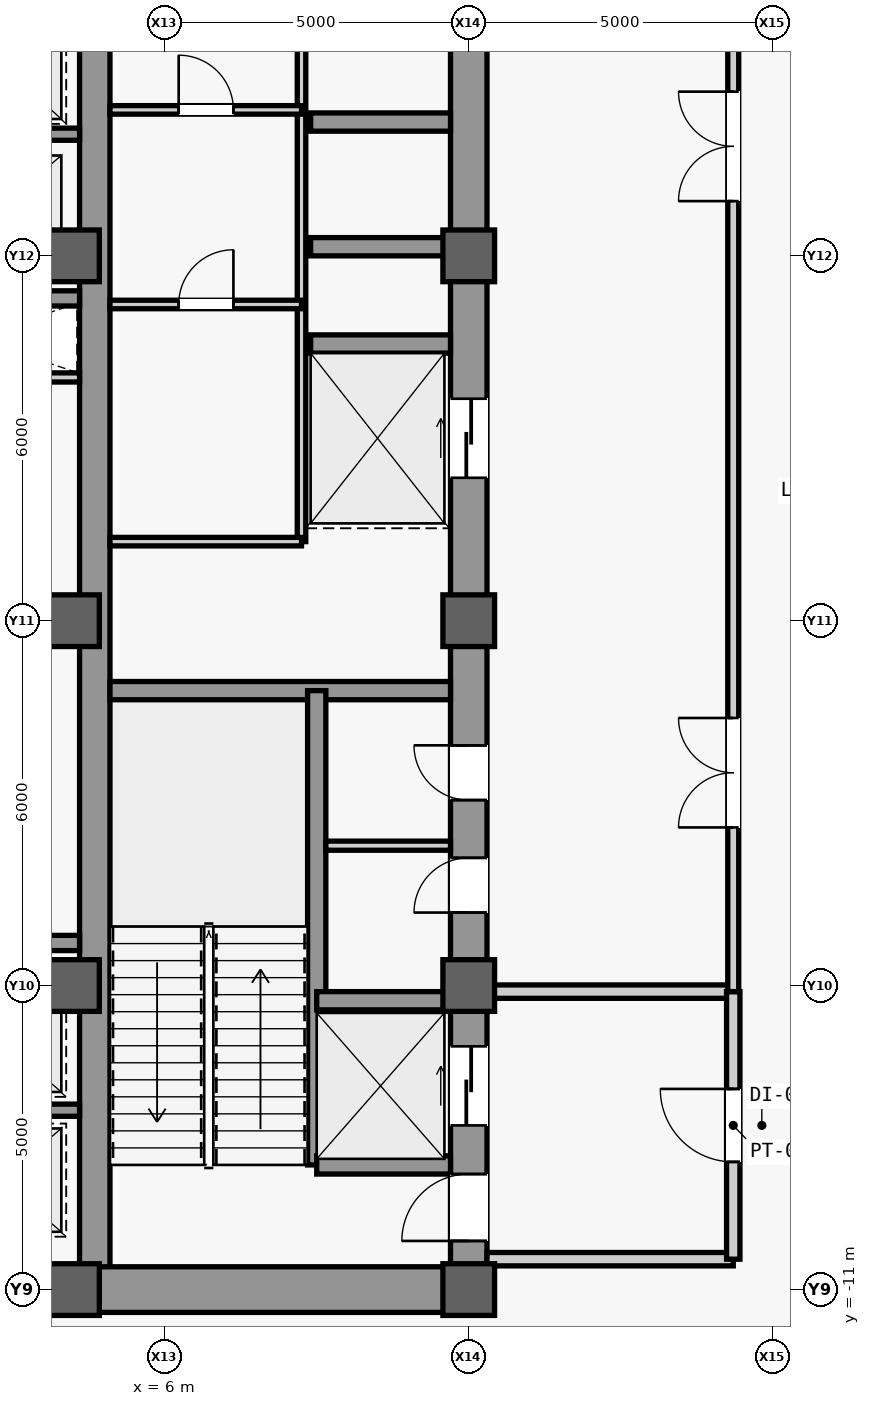
"""IFC4 building model, lengths in metres.
Left out: names, types, materials, properties, quantities, classifications, styles, units other than length and angle.
Written with IfcOpenShell. Run it as: python <this file> out.ifc"""

import sys

from ifc_helpers import new_model, si_unit, direction, frame, frame_2d, origin, origin_2d, place, context, subcontext, project, spatial, rectangle, extrude, source, transform, mapped, element, fill, save


model = new_model("IFC4")
c1 = context("Model", 3, precision=1e-05, world=origin(), true_north=direction((0.0, 1.0)))
c2 = subcontext(c1, "Body", "Model", "MODEL_VIEW")
j1 = project(units=[si_unit("LENGTHUNIT", "METRE"), si_unit("PLANEANGLEUNIT", "RADIAN")], contexts=[c1])
p1 = place(None, origin())
s1 = spatial("IfcSite", under=j1, at=p1, CompositionType="ELEMENT")
p2 = place(p1, origin())
s2 = spatial("IfcBuilding", under=s1, at=p2, CompositionType="ELEMENT")
p3 = place(p2, frame((0.0, 0.0, 144.7)))
s3 = spatial("IfcBuildingStorey", under=s2, at=p3, CompositionType="ELEMENT", Elevation=144.7)
m1 = source(origin(), c2, "Body", "SweptSolid", [
    extrude(rectangle(XDim=22.0, YDim=0.6, at=frame_2d((11.0, 0.0))), origin(), (0.0, 0.0, 1.0), 4.6),
])
p4 = place(p3, frame((11.0, -11.0, 0.0), z_axis=(0.0, 0.0, 1.0), x_axis=(0.0, 1.0, 0.0)))
e1 = element("IfcWall", 1, at=p4, inside=s3, PredefinedType="SHEAR", context=c2, shape_type="MappedRepresentation", body=[
    mapped(m1, transform((0.0, 0.0, 0.0), scale=1.0)),
])
m2 = source(origin(), c2, "Body", "SweptSolid", [
    extrude(rectangle(XDim=1.1, YDim=2.2, at=frame_2d((0.55, 1.1))), frame((0.0, 0.31, 0.0), z_axis=(0.0, -1.0, 0.0), x_axis=(1.0, 0.0, 0.0)), (0.0, 0.0, 1.0), 0.62),
])
p5 = place(p4, frame((0.8, 0.0, 0.0)))
e2 = element("IfcOpeningElement", 2, at=p5, cuts=e1, PredefinedType="OPENING", context=c2, shape_type="MappedRepresentation", body=[
    mapped(m2, transform((0.0, 0.0, 0.0), scale=1.0)),
])
m3 = source(origin(), c2, "Body", "SweptSolid", [
    extrude(rectangle(XDim=0.9, YDim=2.15, at=frame_2d((0.45, 1.075))), frame((0.0, 0.31, 0.0), z_axis=(0.0, -1.0, 0.0), x_axis=(1.0, 0.0, 0.0)), (0.0, 0.0, 1.0), 0.62),
])
p6 = place(p4, frame((6.2, 0.0, 0.0)))
e3 = element("IfcOpeningElement", 3, at=p6, cuts=e1, PredefinedType="OPENING", context=c2, shape_type="MappedRepresentation", body=[
    mapped(m3, transform((0.0, 0.0, 0.0), scale=1.0)),
])
p7 = place(p4, frame((8.05, 0.0, 0.0)))
e4 = element("IfcOpeningElement", 4, at=p7, cuts=e1, PredefinedType="OPENING", context=c2, shape_type="MappedRepresentation", body=[
    mapped(m3, transform((0.0, 0.0, 0.0), scale=1.0)),
])
m4 = source(origin(), c2, "Body", "SweptSolid", [
    extrude(rectangle(XDim=1.3, YDim=2.3, at=frame_2d((0.65, 1.15))), frame((0.0, 0.31, 0.0), z_axis=(0.0, -1.0, 0.0), x_axis=(1.0, 0.0, 0.0)), (0.0, 0.0, 1.0), 0.62),
])
p8 = place(p4, frame((2.7, 0.0, 0.0)))
e5 = element("IfcOpeningElement", 5, at=p8, cuts=e1, PredefinedType="OPENING", context=c2, shape_type="MappedRepresentation", body=[
    mapped(m4, transform((0.0, 0.0, 0.0), scale=1.0)),
])
p9 = place(p4, frame((13.35, 0.0, 0.0)))
e6 = element("IfcOpeningElement", 6, at=p9, cuts=e1, PredefinedType="OPENING", context=c2, shape_type="MappedRepresentation", body=[
    mapped(m4, transform((0.0, 0.0, 0.0), scale=1.0)),
])
m5 = source(origin(), c2, "Body", "SweptSolid", [
    extrude(rectangle(XDim=21.4, YDim=0.5, at=frame_2d((10.7, 0.0))), origin(), (0.0, 0.0, 1.0), 4.6),
])
p10 = place(p3, frame((4.85, -10.7, 0.0), z_axis=(0.0, 0.0, 1.0), x_axis=(0.0, 1.0, 0.0)))
e7 = element("IfcWall", 7, at=p10, inside=s3, PredefinedType="SHEAR", context=c2, shape_type="MappedRepresentation", body=[
    mapped(m5, transform((0.0, 0.0, 0.0), scale=1.0)),
])
m6 = source(origin(), c2, "Body", "SweptSolid", [
    extrude(rectangle(XDim=5.85, YDim=0.75, at=frame_2d((2.925, 0.0))), origin(), (0.0, 0.0, 1.0), 4.6),
])
p11 = place(p3, frame((4.85, -11.0, 0.0), z_axis=(0.0, 0.0, 1.0), x_axis=(1.0, 0.0, 0.0)))
e8 = element("IfcWall", 8, at=p11, inside=s3, PredefinedType="SHEAR", context=c2, shape_type="MappedRepresentation", body=[
    mapped(m6, transform((0.0, 0.0, 0.0), scale=1.0)),
])
m7 = source(origin(), c2, "Body", "SweptSolid", [
    extrude(rectangle(XDim=5.6, YDim=0.3, at=frame_2d((2.8, 0.0))), origin(), (0.0, 0.0, 1.0), 4.6),
])
p12 = place(p3, frame((5.1, -1.15, 0.0), z_axis=(0.0, 0.0, 1.0), x_axis=(1.0, 0.0, 0.0)))
e9 = element("IfcWall", 9, at=p12, inside=s3, PredefinedType="SHEAR", context=c2, shape_type="MappedRepresentation", body=[
    mapped(m7, transform((0.0, 0.0, 0.0), scale=1.0)),
])
m8 = source(origin(), c2, "Body", "SweptSolid", [
    extrude(rectangle(XDim=9.2, YDim=0.5, at=frame_2d((4.6, 0.0))), origin(), (0.0, 0.0, 1.0), 4.6),
])
p13 = place(p3, frame((-4.6, -11.0, 0.0), z_axis=(0.0, 0.0, 1.0), x_axis=(1.0, 0.0, 0.0)))
e10 = element("IfcWall", 10, at=p13, inside=s3, PredefinedType="SHEAR", context=c2, shape_type="MappedRepresentation", body=[
    mapped(m8, transform((0.0, 0.0, 0.0), scale=1.0)),
])
m9 = source(origin(), c2, "Body", "SweptSolid", [
    extrude(rectangle(XDim=1.8, YDim=2.25, at=frame_2d((0.9, 1.125))), frame((0.0, 0.26, 0.0), z_axis=(0.0, -1.0, 0.0), x_axis=(1.0, 0.0, 0.0)), (0.0, 0.0, 1.0), 0.52),
])
p14 = place(p13, frame((3.7, 0.0, 0.0)))
e11 = element("IfcOpeningElement", 11, at=p14, cuts=e10, PredefinedType="OPENING", context=c2, shape_type="MappedRepresentation", body=[
    mapped(m9, transform((0.0, 0.0, 0.0), scale=1.0)),
])
m10 = source(origin(), c2, "Body", "SweptSolid", [
    extrude(rectangle(XDim=0.85, YDim=0.85, at=origin_2d()), origin(), (0.0, 0.0, 1.0), 5.2),
])
for number, where, z_axis, x_axis in (
    (12, (4.5, -11.0, 0.0), (0.0, 0.0, 1.0), (1.0, 0.0, 0.0)),
    (13, (4.5, -6.0, 0.0), (0.0, 0.0, 1.0), (1.0, 0.0, 0.0)),
    (14, (4.5, 0.0, 0.0), (0.0, 0.0, 1.0), (1.0, 0.0, 0.0)),
    (15, (4.5, 6.0, 0.0), (0.0, 0.0, 1.0), (1.0, 0.0, 0.0)),
    (16, (11.0, -11.0, 0.0), (0.0, 0.0, 1.0), (1.0, 0.0, 0.0)),
    (17, (11.0, -6.0, 0.0), (0.0, 0.0, 1.0), (1.0, 0.0, 0.0)),
    (18, (11.0, 0.0, 0.0), (0.0, 0.0, 1.0), (1.0, 0.0, 0.0)),
    (19, (11.0, 6.0, 0.0), (0.0, 0.0, 1.0), (1.0, 0.0, 0.0)),
):
    element("IfcColumn", number, at=place(p3, frame(where, z_axis=z_axis, x_axis=x_axis)), inside=s3, PredefinedType="COLUMN", context=c2, shape_type="MappedRepresentation", body=[
        mapped(m10, transform((0.0, 0.0, 0.0), scale=1.0)),
    ])
m11 = source(origin(), c2, "Body", "SweptSolid", [
    extrude(rectangle(XDim=7.8, YDim=0.3, at=frame_2d((3.9, 0.0))), origin(), (0.0, 0.0, 1.0), 4.6),
])
p15 = place(p3, frame((8.5, -8.95, 0.0), z_axis=(0.0, 0.0, 1.0), x_axis=(0.0, 1.0, 0.0)))
e20 = element("IfcWall", 20, at=p15, inside=s3, PredefinedType="SHEAR", context=c2, shape_type="MappedRepresentation", body=[
    mapped(m11, transform((0.0, 0.0, 0.0), scale=1.0)),
])
m12 = source(origin(), c2, "Body", "SweptSolid", [
    extrude(rectangle(XDim=2.2, YDim=0.3, at=frame_2d((1.1, 0.0))), origin(), (0.0, 0.0, 1.0), 4.6),
])
for number, where, z_axis, x_axis in (
    (21, (8.5, -8.95, 0.0), (0.0, 0.0, 1.0), (1.0, 0.0, 0.0)),
    (22, (8.5, -6.25, 0.0), (0.0, 0.0, 1.0), (1.0, 0.0, 0.0)),
):
    element("IfcWall", number, at=place(p3, frame(where, z_axis=z_axis, x_axis=x_axis)), inside=s3, PredefinedType="SHEAR", context=c2, shape_type="MappedRepresentation", body=[
        mapped(m12, transform((0.0, 0.0, 0.0), scale=1.0)),
    ])
m13 = source(origin(), c2, "Body", "SweptSolid", [
    extrude(rectangle(XDim=2.3, YDim=0.3, at=frame_2d((1.15, 0.0))), origin(), (0.0, 0.0, 1.0), 4.6),
])
for number, where, z_axis, x_axis in (
    (23, (8.4, 4.55, 0.0), (0.0, 0.0, 1.0), (1.0, 0.0, 0.0)),
    (24, (8.4, 6.15, 0.0), (0.0, 0.0, 1.0), (1.0, 0.0, 0.0)),
    (25, (8.4, 8.2, 0.0), (0.0, 0.0, 1.0), (1.0, 0.0, 0.0)),
):
    element("IfcWall", number, at=place(p3, frame(where, z_axis=z_axis, x_axis=x_axis)), inside=s3, PredefinedType="SHEAR", context=c2, shape_type="MappedRepresentation", body=[
        mapped(m13, transform((0.0, 0.0, 0.0), scale=1.0)),
    ])
m14 = source(origin(), c2, "Body", "SweptSolid", [
    extrude(rectangle(XDim=2.05, YDim=0.15, at=frame_2d((1.025, 0.0))), origin(), (0.0, 0.0, 1.0), 4.6),
])
p16 = place(p3, frame((8.65, -3.7, 0.0), z_axis=(0.0, 0.0, 1.0), x_axis=(1.0, 0.0, 0.0)))
e26 = element("IfcWall", 26, at=p16, inside=s3, PredefinedType="PARTITIONING", context=c2, shape_type="MappedRepresentation", body=[
    mapped(m14, transform((0.0, 0.0, 0.0), scale=1.0)),
])
m15 = source(origin(), c2, "Body", "SweptSolid", [
    extrude(rectangle(XDim=9.4, YDim=0.14, at=frame_2d((4.7, 0.0))), origin(), (0.0, 0.0, 1.0), 4.6),
])
p17 = place(p3, frame((8.25, 1.3, 0.0), z_axis=(0.0, 0.0, 1.0), x_axis=(0.0, 1.0, 0.0)))
e27 = element("IfcWall", 27, at=p17, inside=s3, PredefinedType="PARTITIONING", context=c2, shape_type="MappedRepresentation", body=[
    mapped(m15, transform((0.0, 0.0, 0.0), scale=1.0)),
])
m16 = source(origin(), c2, "Body", "SweptSolid", [
    extrude(rectangle(XDim=3.15, YDim=0.14, at=frame_2d((1.575, 0.0))), origin(), (0.0, 0.0, 1.0), 4.6),
])
p18 = place(p3, frame((5.1, 1.3, 0.0), z_axis=(0.0, 0.0, 1.0), x_axis=(1.0, 0.0, 0.0)))
e28 = element("IfcWall", 28, at=p18, inside=s3, PredefinedType="PARTITIONING", context=c2, shape_type="MappedRepresentation", body=[
    mapped(m16, transform((0.0, 0.0, 0.0), scale=1.0)),
])
p19 = place(p3, frame((5.1, 8.4, 0.0), z_axis=(0.0, 0.0, 1.0), x_axis=(1.0, 0.0, 0.0)))
e29 = element("IfcWall", 29, at=p19, inside=s3, PredefinedType="PARTITIONING", context=c2, shape_type="MappedRepresentation", body=[
    mapped(m16, transform((0.0, 0.0, 0.0), scale=1.0)),
])
m17 = source(origin(), c2, "Body", "SweptSolid", [
    extrude(rectangle(XDim=0.9, YDim=2.15, at=frame_2d((0.45, 1.075))), frame((0.0, 0.08, 0.0), z_axis=(0.0, -1.0, 0.0), x_axis=(1.0, 0.0, 0.0)), (0.0, 0.0, 1.0), 0.16),
])
p20 = place(p19, frame((1.13, 0.0, 0.0)))
e30 = element("IfcOpeningElement", 30, at=p20, cuts=e29, PredefinedType="OPENING", context=c2, shape_type="MappedRepresentation", body=[
    mapped(m17, transform((0.0, 0.0, 0.0), scale=1.0)),
])
p21 = place(p3, frame((5.1, 5.2, 0.0), z_axis=(0.0, 0.0, 1.0), x_axis=(1.0, 0.0, 0.0)))
e31 = element("IfcWall", 31, at=p21, inside=s3, PredefinedType="PARTITIONING", context=c2, shape_type="MappedRepresentation", body=[
    mapped(m16, transform((0.0, 0.0, 0.0), scale=1.0)),
])
p22 = place(p21, frame((1.13, 0.0, 0.0)))
e32 = element("IfcOpeningElement", 32, at=p22, cuts=e31, PredefinedType="OPENING", context=c2, shape_type="MappedRepresentation", body=[
    mapped(m17, transform((0.0, 0.0, 0.0), scale=1.0)),
])
m18 = source(origin(), c2, "Body", "SweptSolid", [
    extrude(rectangle(XDim=4.05, YDim=0.22, at=frame_2d((2.025, 0.0))), origin(), (0.0, 0.0, 1.0), 4.6),
])
p23 = place(p3, frame((11.3, -10.5, 0.0), z_axis=(0.0, 0.0, 1.0), x_axis=(1.0, 0.0, 0.0)))
e33 = element("IfcWall", 33, at=p23, inside=s3, PredefinedType="PARTITIONING", context=c2, shape_type="MappedRepresentation", body=[
    mapped(m18, transform((0.0, 0.0, 0.0), scale=1.0)),
])
m19 = source(origin(), c2, "Body", "SweptSolid", [
    extrude(rectangle(XDim=4.05, YDim=0.22, at=frame_2d((2.025, 0.0))), origin(), (0.0, 0.0, 1.0), 2.8),
])
p24 = place(p3, frame((11.3, -6.1, 0.0), z_axis=(0.0, 0.0, 1.0), x_axis=(1.0, 0.0, 0.0)))
e34 = element("IfcWall", 34, at=p24, inside=s3, PredefinedType="PARTITIONING", context=c2, shape_type="MappedRepresentation", body=[
    mapped(m19, transform((0.0, 0.0, 0.0), scale=1.0)),
])
m20 = source(origin(), c2, "Body", "SweptSolid", [
    extrude(rectangle(XDim=4.4, YDim=0.22, at=frame_2d((2.2, 0.0))), origin(), (0.0, 0.0, 1.0), 4.6),
])
p25 = place(p3, frame((15.35, -10.5, 0.0), z_axis=(0.0, 0.0, 1.0), x_axis=(0.0, 1.0, 0.0)))
e35 = element("IfcWall", 35, at=p25, inside=s3, PredefinedType="PARTITIONING", context=c2, shape_type="MappedRepresentation", body=[
    mapped(m20, transform((0.0, 0.0, 0.0), scale=1.0)),
])
m21 = source(origin(), c2, "Body", "SweptSolid", [
    extrude(rectangle(XDim=1.2, YDim=2.2, at=frame_2d((0.6, 1.1))), frame((0.0, 0.12, 0.0), z_axis=(0.0, -1.0, 0.0), x_axis=(1.0, 0.0, 0.0)), (0.0, 0.0, 1.0), 0.24),
])
p26 = place(p25, frame((1.6, 0.0, 0.0)))
e36 = element("IfcOpeningElement", 36, at=p26, cuts=e35, PredefinedType="OPENING", context=c2, shape_type="MappedRepresentation", body=[
    mapped(m21, transform((0.0, 0.0, 0.0), scale=1.0)),
])
m22 = source(origin(), c2, "Body", "SweptSolid", [
    extrude(rectangle(XDim=16.6, YDim=0.18, at=frame_2d((8.3, 0.0))), origin(), (0.0, 0.0, 1.0), 4.6),
])
p27 = place(p3, frame((15.35, -6.1, 0.0), z_axis=(0.0, 0.0, 1.0), x_axis=(0.0, 1.0, 0.0)))
e37 = element("IfcWall", 37, at=p27, inside=s3, PredefinedType="PARTITIONING", context=c2, shape_type="MappedRepresentation", body=[
    mapped(m22, transform((0.0, 0.0, 0.0), scale=1.0)),
])
m23 = source(origin(), c2, "Body", "SweptSolid", [
    extrude(rectangle(XDim=1.8, YDim=2.25, at=frame_2d((0.9, 1.125))), frame((0.0, 0.1, 0.0), z_axis=(0.0, -1.0, 0.0), x_axis=(1.0, 0.0, 0.0)), (0.0, 0.0, 1.0), 0.2),
])
p28 = place(p27, frame((2.7, 0.0, 0.0)))
e38 = element("IfcOpeningElement", 38, at=p28, cuts=e37, PredefinedType="OPENING", context=c2, shape_type="MappedRepresentation", body=[
    mapped(m23, transform((0.0, 0.0, 0.0), scale=1.0)),
])
p29 = place(p27, frame((13.0, 0.0, 0.0)))
e39 = element("IfcOpeningElement", 39, at=p29, cuts=e37, PredefinedType="OPENING", context=c2, shape_type="MappedRepresentation", body=[
    mapped(m23, transform((0.0, 0.0, 0.0), scale=1.0)),
])
m24 = source(origin(), c2, "Body", "SweptSolid", [
    extrude(rectangle(XDim=3.45, YDim=0.15, at=frame_2d((1.725, 0.0))), origin(), (0.0, 0.0, 1.0), 4.6),
])
p30 = place(p3, frame((1.15, 4.0, 0.0), z_axis=(0.0, 0.0, 1.0), x_axis=(1.0, 0.0, 0.0)))
e40 = element("IfcWall", 40, at=p30, inside=s3, PredefinedType="PARTITIONING", context=c2, shape_type="MappedRepresentation", body=[
    mapped(m24, transform((0.0, 0.0, 0.0), scale=1.0)),
])
m25 = source(origin(), c2, "Body", "SweptSolid", [
    extrude(rectangle(XDim=2.45, YDim=0.2, at=frame_2d((1.225, 0.0))), origin(), (0.0, 0.0, 1.0), 4.6),
])
p31 = place(p3, frame((2.15, -8.05, 0.0), z_axis=(0.0, 0.0, 1.0), x_axis=(1.0, 0.0, 0.0)))
e41 = element("IfcWall", 41, at=p31, inside=s3, PredefinedType="SHEAR", context=c2, shape_type="MappedRepresentation", body=[
    mapped(m25, transform((0.0, 0.0, 0.0), scale=1.0)),
])
m26 = source(origin(), c2, "Body", "SweptSolid", [
    extrude(rectangle(XDim=9.2, YDim=0.25, at=frame_2d((4.6, 0.0))), origin(), (0.0, 0.0, 1.0), 4.6),
])
p32 = place(p3, frame((-4.6, -5.3, 0.0), z_axis=(0.0, 0.0, 1.0), x_axis=(1.0, 0.0, 0.0)))
e42 = element("IfcWall", 42, at=p32, inside=s3, PredefinedType="SHEAR", context=c2, shape_type="MappedRepresentation", body=[
    mapped(m26, transform((0.0, 0.0, 0.0), scale=1.0)),
])
m27 = source(origin(), c2, "Body", "SweptSolid", [
    extrude(rectangle(XDim=1.05, YDim=2.2, at=frame_2d((0.525, 1.1))), frame((0.0, 0.135, 0.0), z_axis=(0.0, -1.0, 0.0), x_axis=(1.0, 0.0, 0.0)), (0.0, 0.0, 1.0), 0.27),
])
p33 = place(p32, frame((4.075, 0.0, 0.0)))
e43 = element("IfcOpeningElement", 43, at=p33, cuts=e42, PredefinedType="OPENING", context=c2, shape_type="MappedRepresentation", body=[
    mapped(m27, transform((0.0, 0.0, 0.0), scale=1.0)),
])
p34 = place(p3, frame((2.15, 8.0, 0.0), z_axis=(0.0, 0.0, 1.0), x_axis=(1.0, 0.0, 0.0)))
e44 = element("IfcWall", 44, at=p34, inside=s3, PredefinedType="SHEAR", context=c2, shape_type="MappedRepresentation", body=[
    mapped(m25, transform((0.0, 0.0, 0.0), scale=1.0)),
])
p35 = place(p3, frame((-4.6, 5.3, 0.0), z_axis=(0.0, 0.0, 1.0), x_axis=(1.0, 0.0, 0.0)))
e45 = element("IfcWall", 45, at=p35, inside=s3, PredefinedType="SHEAR", context=c2, shape_type="MappedRepresentation", body=[
    mapped(m26, transform((0.0, 0.0, 0.0), scale=1.0)),
])
p36 = place(p35, frame((4.075, 0.0, 0.0)))
e46 = element("IfcOpeningElement", 46, at=p36, cuts=e45, PredefinedType="OPENING", context=c2, shape_type="MappedRepresentation", body=[
    mapped(m27, transform((0.0, 0.0, 0.0), scale=1.0)),
])
m28 = source(origin(), c2, "Body", "SweptSolid", [
    extrude(rectangle(XDim=1.1, YDim=2.2, at=frame_2d((0.55, 1.1))), frame((0.0, 0.025, 0.0), z_axis=(0.0, -1.0, 0.0), x_axis=(1.0, 0.0, 0.0)), (0.0, 0.0, 1.0), 0.05),
])
p37 = place(p5, origin())
e47 = element("IfcDoor", 47, at=p37, inside=s3, OperationType="SINGLE_SWING_LEFT", PredefinedType="DOOR", context=c2, shape_type="MappedRepresentation", body=[
    mapped(m28, transform((0.0, 0.0, 0.0), scale=1.0)),
])
fill(e2, e47)
m29 = source(origin(), c2, "Body", "SweptSolid", [
    extrude(rectangle(XDim=0.9, YDim=2.15, at=frame_2d((0.45, 1.075))), frame((0.0, 0.025, 0.0), z_axis=(0.0, -1.0, 0.0), x_axis=(1.0, 0.0, 0.0)), (0.0, 0.0, 1.0), 0.05),
])
p38 = place(p6, origin())
e48 = element("IfcDoor", 48, at=p38, inside=s3, OperationType="SINGLE_SWING_LEFT", PredefinedType="DOOR", context=c2, shape_type="MappedRepresentation", body=[
    mapped(m29, transform((0.0, 0.0, 0.0), scale=1.0)),
])
fill(e3, e48)
p39 = place(p7, origin())
e49 = element("IfcDoor", 49, at=p39, inside=s3, OperationType="SINGLE_SWING_RIGHT", PredefinedType="DOOR", context=c2, shape_type="MappedRepresentation", body=[
    mapped(m29, transform((0.0, 0.0, 0.0), scale=1.0)),
])
fill(e4, e49)
p40 = place(p20, origin())
e50 = element("IfcDoor", 50, at=p40, inside=s3, OperationType="SINGLE_SWING_LEFT", PredefinedType="DOOR", context=c2, shape_type="MappedRepresentation", body=[
    mapped(m29, transform((0.0, 0.0, 0.0), scale=1.0)),
])
fill(e30, e50)
p41 = place(p22, origin())
e51 = element("IfcDoor", 51, at=p41, inside=s3, OperationType="SINGLE_SWING_RIGHT", PredefinedType="DOOR", context=c2, shape_type="MappedRepresentation", body=[
    mapped(m29, transform((0.0, 0.0, 0.0), scale=1.0)),
])
fill(e32, e51)
m30 = source(origin(), c2, "Body", "SweptSolid", [
    extrude(rectangle(XDim=1.2, YDim=2.2, at=frame_2d((0.6, 1.1))), frame((0.0, 0.025, 0.0), z_axis=(0.0, -1.0, 0.0), x_axis=(1.0, 0.0, 0.0)), (0.0, 0.0, 1.0), 0.05),
])
p42 = place(p26, origin())
e52 = element("IfcDoor", 52, at=p42, inside=s3, OperationType="SINGLE_SWING_RIGHT", PredefinedType="DOOR", context=c2, shape_type="MappedRepresentation", body=[
    mapped(m30, transform((0.0, 0.0, 0.0), scale=1.0)),
])
fill(e36, e52)
m31 = source(origin(), c2, "Body", "SweptSolid", [
    extrude(rectangle(XDim=1.8, YDim=2.25, at=frame_2d((0.9, 1.125))), frame((0.0, 0.025, 0.0), z_axis=(0.0, -1.0, 0.0), x_axis=(1.0, 0.0, 0.0)), (0.0, 0.0, 1.0), 0.05),
])
p43 = place(p28, origin())
e53 = element("IfcDoor", 53, at=p43, inside=s3, OperationType="SINGLE_SWING_RIGHT", PredefinedType="DOOR", context=c2, shape_type="MappedRepresentation", body=[
    mapped(m31, transform((0.0, 0.0, 0.0), scale=1.0)),
])
fill(e38, e53)
p44 = place(p29, origin())
e54 = element("IfcDoor", 54, at=p44, inside=s3, OperationType="SINGLE_SWING_LEFT", PredefinedType="DOOR", context=c2, shape_type="MappedRepresentation", body=[
    mapped(m31, transform((0.0, 0.0, 0.0), scale=1.0)),
])
fill(e39, e54)
m32 = source(origin(), c2, "Body", "SweptSolid", [
    extrude(rectangle(XDim=1.3, YDim=2.3, at=frame_2d((0.65, 1.15))), frame((0.0, 0.025, 0.0), z_axis=(0.0, -1.0, 0.0), x_axis=(1.0, 0.0, 0.0)), (0.0, 0.0, 1.0), 0.05),
])
p45 = place(p8, origin())
e55 = element("IfcDoor", 55, at=p45, inside=s3, OperationType="SLIDING_TO_LEFT", PredefinedType="DOOR", context=c2, shape_type="MappedRepresentation", body=[
    mapped(m32, transform((0.0, 0.0, 0.0), scale=1.0)),
])
fill(e5, e55)
p46 = place(p9, origin())
e56 = element("IfcDoor", 56, at=p46, inside=s3, OperationType="SLIDING_TO_LEFT", PredefinedType="DOOR", context=c2, shape_type="MappedRepresentation", body=[
    mapped(m32, transform((0.0, 0.0, 0.0), scale=1.0)),
])
fill(e6, e56)
save(model, sys.argv[1])
